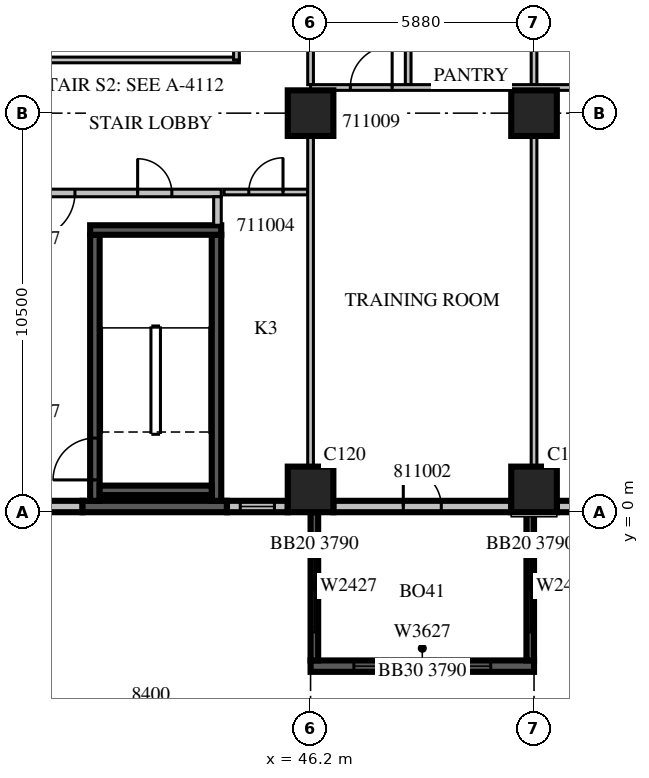
"""IFC4 building model, lengths in metres.
Left out: names, types, materials, properties, quantities, classifications, styles, units other than length and angle.
Written with IfcOpenShell. Run it as: python <this file> out.ifc"""

import sys

from ifc_helpers import new_model, si_unit, direction, frame, frame_2d, origin, origin_2d, place, context, subcontext, project, spatial, rectangle, extrude, source, transform, mapped, element, fill, save


model = new_model("IFC4")
c1 = context("Model", 3, precision=1e-05, world=origin(), true_north=direction((0.0, 1.0)))
c2 = subcontext(c1, "Body", "Model", "MODEL_VIEW")
j1 = project(units=[si_unit("LENGTHUNIT", "METRE"), si_unit("PLANEANGLEUNIT", "RADIAN")], contexts=[c1])
p1 = place(None, origin())
s1 = spatial("IfcSite", under=j1, at=p1, CompositionType="ELEMENT")
p2 = place(p1, origin())
s2 = spatial("IfcBuilding", under=s1, at=p2, CompositionType="ELEMENT")
p3 = place(p2, frame((0.0, 0.0, 57.3)))
s3 = spatial("IfcBuildingStorey", under=s2, at=p3, CompositionType="ELEMENT", Elevation=57.3)
m1 = source(origin(), c2, "Body", "SweptSolid", [
    extrude(rectangle(XDim=1.2, YDim=1.2, at=origin_2d()), origin(), (0.0, 0.0, 1.0), 4.2),
])
for number, where, z_axis, x_axis in (
    (1, (46.2, 0.6, 0.0), (0.0, 0.0, 1.0), (1.0, 0.0, 0.0)),
    (2, (52.08, 0.6, 0.0), (0.0, 0.0, 1.0), (1.0, 0.0, 0.0)),
    (3, (46.2, 10.5, 0.0), (0.0, 0.0, 1.0), (1.0, 0.0, 0.0)),
    (4, (52.08, 10.5, 0.0), (0.0, 0.0, 1.0), (1.0, 0.0, 0.0)),
):
    element("IfcColumn", number, at=place(p3, frame(where, z_axis=z_axis, x_axis=x_axis)), inside=s3, PredefinedType="COLUMN", context=c2, shape_type="MappedRepresentation", body=[
        mapped(m1, transform((0.0, 0.0, 0.0), scale=1.0)),
    ])
m2 = source(origin(), c2, "Body", "SweptSolid", [
    extrude(rectangle(XDim=1.2, YDim=0.3, at=frame_2d((0.6, 0.0))), origin(), (0.0, 0.0, 1.0), 3.8),
])
p4 = place(p3, frame((39.0, 0.15, 0.0), z_axis=(0.0, 0.0, 1.0), x_axis=(1.0, 0.0, 0.0)))
e5 = element("IfcWall", 5, at=p4, inside=s3, PredefinedType="STANDARD", context=c2, shape_type="MappedRepresentation", body=[
    mapped(m2, transform((0.0, 0.0, 0.0), scale=1.0)),
])
m3 = source(origin(), c2, "Body", "SweptSolid", [
    extrude(rectangle(XDim=3.8, YDim=0.3, at=frame_2d((1.9, 0.0))), origin(), (0.0, 0.0, 1.0), 3.8),
])
p5 = place(p3, frame((40.2, 0.15, 0.0), z_axis=(0.0, 0.0, 1.0), x_axis=(1.0, 0.0, 0.0)))
e6 = element("IfcWall", 6, at=p5, inside=s3, PredefinedType="SOLIDWALL", context=c2, shape_type="MappedRepresentation", body=[
    mapped(m3, transform((0.0, 0.0, 0.0), scale=1.0)),
])
m4 = source(origin(), c2, "Body", "SweptSolid", [
    extrude(rectangle(XDim=1.6, YDim=0.3, at=frame_2d((0.8, 0.0))), origin(), (0.0, 0.0, 1.0), 3.8),
])
p6 = place(p3, frame((44.0, 0.15, 0.0), z_axis=(0.0, 0.0, 1.0), x_axis=(1.0, 0.0, 0.0)))
e7 = element("IfcWall", 7, at=p6, inside=s3, PredefinedType="STANDARD", context=c2, shape_type="MappedRepresentation", body=[
    mapped(m4, transform((0.0, 0.0, 0.0), scale=1.0)),
])
m5 = source(origin(), c2, "Body", "SweptSolid", [
    extrude(rectangle(XDim=0.9, YDim=2.7, at=frame_2d((0.45, 1.35))), frame((0.0, 0.16, 0.0), z_axis=(0.0, -1.0, 0.0), x_axis=(1.0, 0.0, 0.0)), (0.0, 0.0, 1.0), 0.32),
])
p7 = place(p6, frame((0.35, 0.0, 0.6)))
e8 = element("IfcOpeningElement", 8, at=p7, cuts=e7, PredefinedType="OPENING", context=c2, shape_type="MappedRepresentation", body=[
    mapped(m5, transform((0.0, 0.0, 0.0), scale=1.0)),
])
m6 = source(origin(), c2, "Body", "SweptSolid", [
    extrude(rectangle(XDim=4.68, YDim=0.3, at=frame_2d((2.34, 0.0))), origin(), (0.0, 0.0, 1.0), 3.8),
])
p8 = place(p3, frame((46.8, 0.15, 0.0), z_axis=(0.0, 0.0, 1.0), x_axis=(1.0, 0.0, 0.0)))
e9 = element("IfcWall", 9, at=p8, inside=s3, PredefinedType="STANDARD", context=c2, shape_type="MappedRepresentation", body=[
    mapped(m6, transform((0.0, 0.0, 0.0), scale=1.0)),
])
m7 = source(origin(), c2, "Body", "SweptSolid", [
    extrude(rectangle(XDim=1.0, YDim=2.1, at=frame_2d((0.5, 1.05))), frame((0.0, 0.16, 0.0), z_axis=(0.0, -1.0, 0.0), x_axis=(1.0, 0.0, 0.0)), (0.0, 0.0, 1.0), 0.32),
])
p9 = place(p8, frame((1.84, 0.0, 0.0)))
e10 = element("IfcOpeningElement", 10, at=p9, cuts=e9, PredefinedType="OPENING", context=c2, shape_type="MappedRepresentation", body=[
    mapped(m7, transform((0.0, 0.0, 0.0), scale=1.0)),
])
p10 = place(p3, frame((52.68, 0.15, 0.0), z_axis=(0.0, 0.0, 1.0), x_axis=(1.0, 0.0, 0.0)))
e11 = element("IfcWall", 11, at=p10, inside=s3, PredefinedType="STANDARD", context=c2, shape_type="MappedRepresentation", body=[
    mapped(m6, transform((0.0, 0.0, 0.0), scale=1.0)),
])
m8 = source(origin(), c2, "Body", "SweptSolid", [
    extrude(rectangle(XDim=3.6, YDim=2.7, at=frame_2d((1.8, 1.35))), frame((0.0, 0.16, 0.0), z_axis=(0.0, -1.0, 0.0), x_axis=(1.0, 0.0, 0.0)), (0.0, 0.0, 1.0), 0.32),
])
p11 = place(p10, frame((0.54, 0.0, 0.6)))
e12 = element("IfcOpeningElement", 12, at=p11, cuts=e11, PredefinedType="OPENING", context=c2, shape_type="MappedRepresentation", body=[
    mapped(m8, transform((0.0, 0.0, 0.0), scale=1.0)),
])
m9 = source(origin(), c2, "Body", "SweptSolid", [
    extrude(rectangle(XDim=5.88, YDim=0.3, at=frame_2d((2.94, 0.0))), origin(), (0.0, 0.0, 1.0), 3.79),
])
p12 = place(p3, frame((46.2, -4.05, 0.0), z_axis=(0.0, 0.0, 1.0), x_axis=(1.0, 0.0, 0.0)))
e13 = element("IfcWall", 13, at=p12, inside=s3, PredefinedType="SOLIDWALL", context=c2, shape_type="MappedRepresentation", body=[
    mapped(m9, transform((0.0, 0.0, 0.0), scale=1.0)),
])
p13 = place(p12, frame((1.14, 0.0, 0.6)))
e14 = element("IfcOpeningElement", 14, at=p13, cuts=e13, PredefinedType="OPENING", context=c2, shape_type="MappedRepresentation", body=[
    mapped(m8, transform((0.0, 0.0, 0.0), scale=1.0)),
])
m10 = source(origin(), c2, "Body", "SweptSolid", [
    extrude(rectangle(XDim=3.9, YDim=0.2, at=frame_2d((1.95, 0.0))), origin(), (0.0, 0.0, 1.0), 3.79),
])
p14 = place(p3, frame((46.3, 0.0, 0.0), z_axis=(0.0, 0.0, 1.0), x_axis=(0.0, -1.0, 0.0)))
e15 = element("IfcWall", 15, at=p14, inside=s3, PredefinedType="SOLIDWALL", context=c2, shape_type="MappedRepresentation", body=[
    mapped(m10, transform((0.0, 0.0, 0.0), scale=1.0)),
])
m11 = source(origin(), c2, "Body", "SweptSolid", [
    extrude(rectangle(XDim=2.4, YDim=2.7, at=frame_2d((1.2, 1.35))), frame((0.0, 0.11, 0.0), z_axis=(0.0, -1.0, 0.0), x_axis=(1.0, 0.0, 0.0)), (0.0, 0.0, 1.0), 0.22),
])
p15 = place(p14, frame((0.75, 0.0, 0.6)))
e16 = element("IfcOpeningElement", 16, at=p15, cuts=e15, PredefinedType="OPENING", context=c2, shape_type="MappedRepresentation", body=[
    mapped(m11, transform((0.0, 0.0, 0.0), scale=1.0)),
])
p16 = place(p3, frame((51.98, 0.0, 0.0), z_axis=(0.0, 0.0, 1.0), x_axis=(0.0, -1.0, 0.0)))
e17 = element("IfcWall", 17, at=p16, inside=s3, PredefinedType="SOLIDWALL", context=c2, shape_type="MappedRepresentation", body=[
    mapped(m10, transform((0.0, 0.0, 0.0), scale=1.0)),
])
p17 = place(p16, frame((0.75, 0.0, 0.6)))
e18 = element("IfcOpeningElement", 18, at=p17, cuts=e17, PredefinedType="OPENING", context=c2, shape_type="MappedRepresentation", body=[
    mapped(m11, transform((0.0, 0.0, 0.0), scale=1.0)),
])
m12 = source(origin(), c2, "Body", "SweptSolid", [
    extrude(rectangle(XDim=7.0, YDim=0.25, at=frame_2d((3.5, 0.0))), origin(), (0.0, 0.0, 1.0), 3.8),
])
p18 = place(p3, frame((40.525, 0.3, 0.0), z_axis=(0.0, 0.0, 1.0), x_axis=(0.0, 1.0, 0.0)))
e19 = element("IfcWall", 19, at=p18, inside=s3, PredefinedType="SOLIDWALL", context=c2, shape_type="MappedRepresentation", body=[
    mapped(m12, transform((0.0, 0.0, 0.0), scale=1.0)),
])
m13 = source(origin(), c2, "Body", "SweptSolid", [
    extrude(rectangle(XDim=1.1, YDim=2.1, at=frame_2d((0.55, 1.05))), frame((0.0, 0.135, 0.0), z_axis=(0.0, -1.0, 0.0), x_axis=(1.0, 0.0, 0.0)), (0.0, 0.0, 1.0), 0.27),
])
p19 = place(p18, frame((0.55, 0.0, 0.0)))
e20 = element("IfcOpeningElement", 20, at=p19, cuts=e19, PredefinedType="OPENING", context=c2, shape_type="MappedRepresentation", body=[
    mapped(m13, transform((0.0, 0.0, 0.0), scale=1.0)),
])
p20 = place(p3, frame((43.725, 0.3, 0.0), z_axis=(0.0, 0.0, 1.0), x_axis=(0.0, 1.0, 0.0)))
e21 = element("IfcWall", 21, at=p20, inside=s3, PredefinedType="SOLIDWALL", context=c2, shape_type="MappedRepresentation", body=[
    mapped(m12, transform((0.0, 0.0, 0.0), scale=1.0)),
])
m14 = source(origin(), c2, "Body", "SweptSolid", [
    extrude(rectangle(XDim=3.45, YDim=0.25, at=frame_2d((1.725, 0.0))), origin(), (0.0, 0.0, 1.0), 3.8),
])
p21 = place(p3, frame((40.4, 7.425, 0.0), z_axis=(0.0, 0.0, 1.0), x_axis=(1.0, 0.0, 0.0)))
e22 = element("IfcWall", 22, at=p21, inside=s3, PredefinedType="SOLIDWALL", context=c2, shape_type="MappedRepresentation", body=[
    mapped(m14, transform((0.0, 0.0, 0.0), scale=1.0)),
])
m15 = source(origin(), c2, "Body", "SweptSolid", [
    extrude(rectangle(XDim=2.95, YDim=0.25, at=frame_2d((1.475, 0.0))), origin(), (0.0, 0.0, 1.0), 3.8),
])
p22 = place(p3, frame((40.65, 0.575, 0.0), z_axis=(0.0, 0.0, 1.0), x_axis=(1.0, 0.0, 0.0)))
e23 = element("IfcWall", 23, at=p22, inside=s3, PredefinedType="SOLIDWALL", context=c2, shape_type="MappedRepresentation", body=[
    mapped(m15, transform((0.0, 0.0, 0.0), scale=1.0)),
])
m16 = source(origin(), c2, "Body", "SweptSolid", [
    extrude(rectangle(XDim=5.45, YDim=0.2, at=frame_2d((2.725, 0.0))), origin(), (0.0, 0.0, 1.0), 3.8),
])
p23 = place(p3, frame((38.4, 8.4, 0.0), z_axis=(0.0, 0.0, 1.0), x_axis=(1.0, 0.0, 0.0)))
e24 = element("IfcWall", 24, at=p23, inside=s3, PredefinedType="PARTITIONING", context=c2, shape_type="MappedRepresentation", body=[
    mapped(m16, transform((0.0, 0.0, 0.0), scale=1.0)),
])
m17 = source(origin(), c2, "Body", "SweptSolid", [
    extrude(rectangle(XDim=1.2, YDim=2.1, at=frame_2d((0.6, 1.05))), frame((0.0, 0.11, 0.0), z_axis=(0.0, -1.0, 0.0), x_axis=(1.0, 0.0, 0.0)), (0.0, 0.0, 1.0), 0.22),
])
p24 = place(p23, frame((0.4, 0.0, 0.0)))
e25 = element("IfcOpeningElement", 25, at=p24, cuts=e24, PredefinedType="OPENING", context=c2, shape_type="MappedRepresentation", body=[
    mapped(m17, transform((0.0, 0.0, 0.0), scale=1.0)),
])
m18 = source(origin(), c2, "Body", "SweptSolid", [
    extrude(rectangle(XDim=0.9, YDim=2.1, at=frame_2d((0.45, 1.05))), frame((0.0, 0.11, 0.0), z_axis=(0.0, -1.0, 0.0), x_axis=(1.0, 0.0, 0.0)), (0.0, 0.0, 1.0), 0.22),
])
p25 = place(p23, frame((3.25, 0.0, 0.0)))
e26 = element("IfcOpeningElement", 26, at=p25, cuts=e24, PredefinedType="OPENING", context=c2, shape_type="MappedRepresentation", body=[
    mapped(m18, transform((0.0, 0.0, 0.0), scale=1.0)),
])
m19 = source(origin(), c2, "Body", "SweptSolid", [
    extrude(rectangle(XDim=0.75, YDim=0.2, at=frame_2d((0.375, 0.0))), origin(), (0.0, 0.0, 1.0), 3.8),
])
p26 = place(p3, frame((43.75, 7.55, 0.0), z_axis=(0.0, 0.0, 1.0), x_axis=(0.0, 1.0, 0.0)))
e27 = element("IfcWall", 27, at=p26, inside=s3, PredefinedType="PARTITIONING", context=c2, shape_type="MappedRepresentation", body=[
    mapped(m19, transform((0.0, 0.0, 0.0), scale=1.0)),
])
m20 = source(origin(), c2, "Body", "SweptSolid", [
    extrude(rectangle(XDim=6.45, YDim=0.15, at=frame_2d((3.225, 0.0))), origin(), (0.0, 0.0, 1.0), 3.8),
])
p27 = place(p3, frame((37.875, 11.9, 0.0), z_axis=(0.0, 0.0, 1.0), x_axis=(1.0, 0.0, 0.0)))
e28 = element("IfcWall", 28, at=p27, inside=s3, PredefinedType="PARTITIONING", context=c2, shape_type="MappedRepresentation", body=[
    mapped(m20, transform((0.0, 0.0, 0.0), scale=1.0)),
])
p28 = place(p3, frame((44.25, 11.9, 0.0), z_axis=(0.0, 0.0, 1.0), x_axis=(0.0, 1.0, 0.0)))
e29 = element("IfcWall", 29, at=p28, inside=s3, PredefinedType="PARTITIONING", context=c2, shape_type="SweptSolid", body=[
    extrude(rectangle(XDim=2.875, YDim=0.15, at=frame_2d((1.438, 0.0))), origin(), (0.0, 0.0, 1.0), 3.8),
])
m21 = source(origin(), c2, "Body", "SweptSolid", [
    extrude(rectangle(XDim=2.2, YDim=0.15, at=frame_2d((1.1, 0.0))), origin(), (0.0, 0.0, 1.0), 3.8),
])
p29 = place(p3, frame((46.125, 8.425, 0.0), z_axis=(0.0, 0.0, 1.0), x_axis=(-1.0, 0.0, 0.0)))
e30 = element("IfcWall", 30, at=p29, inside=s3, PredefinedType="PARTITIONING", context=c2, shape_type="MappedRepresentation", body=[
    mapped(m21, transform((0.0, 0.0, 0.0), scale=1.0)),
])
m22 = source(origin(), c2, "Body", "SweptSolid", [
    extrude(rectangle(XDim=0.9, YDim=2.1, at=frame_2d((0.45, 1.05))), frame((0.0, 0.085, 0.0), z_axis=(0.0, -1.0, 0.0), x_axis=(1.0, 0.0, 0.0)), (0.0, 0.0, 1.0), 0.17),
])
p30 = place(p29, frame((0.65, 0.0, 0.0)))
e31 = element("IfcOpeningElement", 31, at=p30, cuts=e30, PredefinedType="OPENING", context=c2, shape_type="MappedRepresentation", body=[
    mapped(m22, transform((0.0, 0.0, 0.0), scale=1.0)),
])
p31 = place(p3, frame((48.768, 11.25, 0.0), z_axis=(0.0, 0.0, 1.0), x_axis=(0.0, 1.0, 0.0)))
e32 = element("IfcWall", 32, at=p31, inside=s3, PredefinedType="PARTITIONING", context=c2, shape_type="SweptSolid", body=[
    extrude(rectangle(XDim=3.45, YDim=0.15, at=frame_2d((1.725, 0.0))), origin(), (0.0, 0.0, 1.0), 3.8),
])
m23 = source(origin(), c2, "Body", "SweptSolid", [
    extrude(rectangle(XDim=8.702, YDim=0.15, at=frame_2d((4.351, 0.0))), origin(), (0.0, 0.0, 1.0), 3.8),
])
p32 = place(p3, frame((46.2, 1.199, 0.0), z_axis=(0.0, 0.0, 1.0), x_axis=(0.0, 1.0, 0.0)))
e33 = element("IfcWall", 33, at=p32, inside=s3, PredefinedType="PARTITIONING", context=c2, shape_type="MappedRepresentation", body=[
    mapped(m23, transform((0.0, 0.0, 0.0), scale=1.0)),
])
m24 = source(origin(), c2, "Body", "SweptSolid", [
    extrude(rectangle(XDim=3.45, YDim=0.15, at=frame_2d((1.725, 0.0))), origin(), (0.0, 0.0, 1.0), 3.8),
])
p33 = place(p3, frame((46.2, 11.25, 0.0), z_axis=(0.0, 0.0, 1.0), x_axis=(0.0, 1.0, 0.0)))
e34 = element("IfcWall", 34, at=p33, inside=s3, PredefinedType="PARTITIONING", context=c2, shape_type="MappedRepresentation", body=[
    mapped(m24, transform((0.0, 0.0, 0.0), scale=1.0)),
])
p34 = place(p3, frame((52.08, 1.199, 0.0), z_axis=(0.0, 0.0, 1.0), x_axis=(0.0, 1.0, 0.0)))
e35 = element("IfcWall", 35, at=p34, inside=s3, PredefinedType="PARTITIONING", context=c2, shape_type="MappedRepresentation", body=[
    mapped(m23, transform((0.0, 0.0, 0.0), scale=1.0)),
])
p35 = place(p3, frame((52.08, 11.25, 0.0), z_axis=(0.0, 0.0, 1.0), x_axis=(0.0, 1.0, 0.0)))
e36 = element("IfcWall", 36, at=p35, inside=s3, PredefinedType="PARTITIONING", context=c2, shape_type="MappedRepresentation", body=[
    mapped(m24, transform((0.0, 0.0, 0.0), scale=1.0)),
])
m25 = source(origin(), c2, "Body", "SweptSolid", [
    extrude(rectangle(XDim=24.9, YDim=0.15, at=frame_2d((12.45, 0.0))), origin(), (0.0, 0.0, 1.0), 3.8),
])
p36 = place(p3, frame((71.1, 11.175, 0.0), z_axis=(0.0, 0.0, 1.0), x_axis=(-1.0, 0.0, 0.0)))
e37 = element("IfcWall", 37, at=p36, inside=s3, PredefinedType="PARTITIONING", context=c2, shape_type="MappedRepresentation", body=[
    mapped(m25, transform((0.0, 0.0, 0.0), scale=1.0)),
])
m26 = source(origin(), c2, "Body", "SweptSolid", [
    extrude(rectangle(XDim=1.1, YDim=2.1, at=frame_2d((0.55, 1.05))), frame((0.0, 0.085, 0.0), z_axis=(0.0, -1.0, 0.0), x_axis=(1.0, 0.0, 0.0)), (0.0, 0.0, 1.0), 0.17),
])
p37 = place(p36, frame((22.753, 0.0, 0.0)))
e38 = element("IfcOpeningElement", 38, at=p37, cuts=e37, PredefinedType="OPENING", context=c2, shape_type="MappedRepresentation", body=[
    mapped(m26, transform((0.0, 0.0, 0.0), scale=1.0)),
])
p38 = place(p36, frame((8.683, 0.0, 0.0)))
e39 = element("IfcOpeningElement", 39, at=p38, cuts=e37, PredefinedType="OPENING", context=c2, shape_type="MappedRepresentation", body=[
    mapped(m26, transform((0.0, 0.0, 0.0), scale=1.0)),
])
p39 = place(p36, frame((4.738, 0.0, 0.0)))
e40 = element("IfcOpeningElement", 40, at=p39, cuts=e37, PredefinedType="OPENING", context=c2, shape_type="MappedRepresentation", body=[
    mapped(m26, transform((0.0, 0.0, 0.0), scale=1.0)),
])
m27 = source(origin(), c2, "Body", "SweptSolid", [
    extrude(rectangle(XDim=0.9, YDim=2.7, at=frame_2d((0.45, 1.35))), frame((0.0, 0.03, 0.0), z_axis=(0.0, -1.0, 0.0), x_axis=(1.0, 0.0, 0.0)), (0.0, 0.0, 1.0), 0.06),
])
p40 = place(p7, origin())
e41 = element("IfcWindow", 41, at=p40, inside=s3, PartitioningType="SINGLE_PANEL", PredefinedType="WINDOW", context=c2, shape_type="MappedRepresentation", body=[
    mapped(m27, transform((0.0, 0.0, 0.0), scale=1.0)),
])
fill(e8, e41)
m28 = source(origin(), c2, "Body", "SweptSolid", [
    extrude(rectangle(XDim=3.6, YDim=2.7, at=frame_2d((1.8, 1.35))), frame((0.0, 0.03, 0.0), z_axis=(0.0, -1.0, 0.0), x_axis=(1.0, 0.0, 0.0)), (0.0, 0.0, 1.0), 0.06),
])
p41 = place(p13, origin())
e42 = element("IfcWindow", 42, at=p41, inside=s3, PartitioningType="SINGLE_PANEL", PredefinedType="WINDOW", context=c2, shape_type="MappedRepresentation", body=[
    mapped(m28, transform((0.0, 0.0, 0.0), scale=1.0)),
])
fill(e14, e42)
m29 = source(origin(), c2, "Body", "SweptSolid", [
    extrude(rectangle(XDim=2.4, YDim=2.7, at=frame_2d((1.2, 1.35))), frame((0.0, 0.03, 0.0), z_axis=(0.0, -1.0, 0.0), x_axis=(1.0, 0.0, 0.0)), (0.0, 0.0, 1.0), 0.06),
])
p42 = place(p15, origin())
e43 = element("IfcWindow", 43, at=p42, inside=s3, PartitioningType="SINGLE_PANEL", PredefinedType="WINDOW", context=c2, shape_type="MappedRepresentation", body=[
    mapped(m29, transform((0.0, 0.0, 0.0), scale=1.0)),
])
fill(e16, e43)
p43 = place(p17, origin())
e44 = element("IfcWindow", 44, at=p43, inside=s3, PartitioningType="SINGLE_PANEL", PredefinedType="WINDOW", context=c2, shape_type="MappedRepresentation", body=[
    mapped(m29, transform((0.0, 0.0, 0.0), scale=1.0)),
])
fill(e18, e44)
m30 = source(origin(), c2, "Body", "SweptSolid", [
    extrude(rectangle(XDim=1.1, YDim=2.1, at=frame_2d((0.55, 1.05))), frame((0.0, 0.025, 0.0), z_axis=(0.0, -1.0, 0.0), x_axis=(1.0, 0.0, 0.0)), (0.0, 0.0, 1.0), 0.05),
])
p44 = place(p19, origin())
e45 = element("IfcDoor", 45, at=p44, inside=s3, OperationType="SINGLE_SWING_LEFT", PredefinedType="DOOR", context=c2, shape_type="MappedRepresentation", body=[
    mapped(m30, transform((0.0, 0.0, 0.0), scale=1.0)),
])
fill(e20, e45)
m31 = source(origin(), c2, "Body", "SweptSolid", [
    extrude(rectangle(XDim=1.2, YDim=2.1, at=frame_2d((0.6, 1.05))), frame((0.0, 0.025, 0.0), z_axis=(0.0, -1.0, 0.0), x_axis=(1.0, 0.0, 0.0)), (0.0, 0.0, 1.0), 0.05),
])
p45 = place(p24, origin())
e46 = element("IfcDoor", 46, at=p45, inside=s3, OperationType="SINGLE_SWING_RIGHT", PredefinedType="DOOR", context=c2, shape_type="MappedRepresentation", body=[
    mapped(m31, transform((0.0, 0.0, 0.0), scale=1.0)),
])
fill(e25, e46)
m32 = source(origin(), c2, "Body", "SweptSolid", [
    extrude(rectangle(XDim=0.9, YDim=2.1, at=frame_2d((0.45, 1.05))), frame((0.0, 0.025, 0.0), z_axis=(0.0, -1.0, 0.0), x_axis=(1.0, 0.0, 0.0)), (0.0, 0.0, 1.0), 0.05),
])
p46 = place(p25, origin())
e47 = element("IfcDoor", 47, at=p46, inside=s3, OperationType="SINGLE_SWING_LEFT", PredefinedType="DOOR", context=c2, shape_type="MappedRepresentation", body=[
    mapped(m32, transform((0.0, 0.0, 0.0), scale=1.0)),
])
fill(e26, e47)
p47 = place(p30, origin())
e48 = element("IfcDoor", 48, at=p47, inside=s3, OperationType="SINGLE_SWING_RIGHT", PredefinedType="DOOR", context=c2, shape_type="MappedRepresentation", body=[
    mapped(m32, transform((0.0, 0.0, 0.0), scale=1.0)),
])
fill(e31, e48)
p48 = place(p37, origin())
e49 = element("IfcDoor", 49, at=p48, inside=s3, OperationType="SINGLE_SWING_RIGHT", PredefinedType="DOOR", context=c2, shape_type="MappedRepresentation", body=[
    mapped(m30, transform((0.0, 0.0, 0.0), scale=1.0)),
])
fill(e38, e49)
m33 = source(origin(), c2, "Body", "SweptSolid", [
    extrude(rectangle(XDim=1.0, YDim=2.1, at=frame_2d((0.5, 1.05))), frame((0.0, 0.025, 0.0), z_axis=(0.0, -1.0, 0.0), x_axis=(1.0, 0.0, 0.0)), (0.0, 0.0, 1.0), 0.05),
])
p49 = place(p9, origin())
e50 = element("IfcDoor", 50, at=p49, inside=s3, OperationType="SINGLE_SWING_LEFT", PredefinedType="DOOR", context=c2, shape_type="MappedRepresentation", body=[
    mapped(m33, transform((0.0, 0.0, 0.0), scale=1.0)),
])
fill(e10, e50)
save(model, sys.argv[1])
